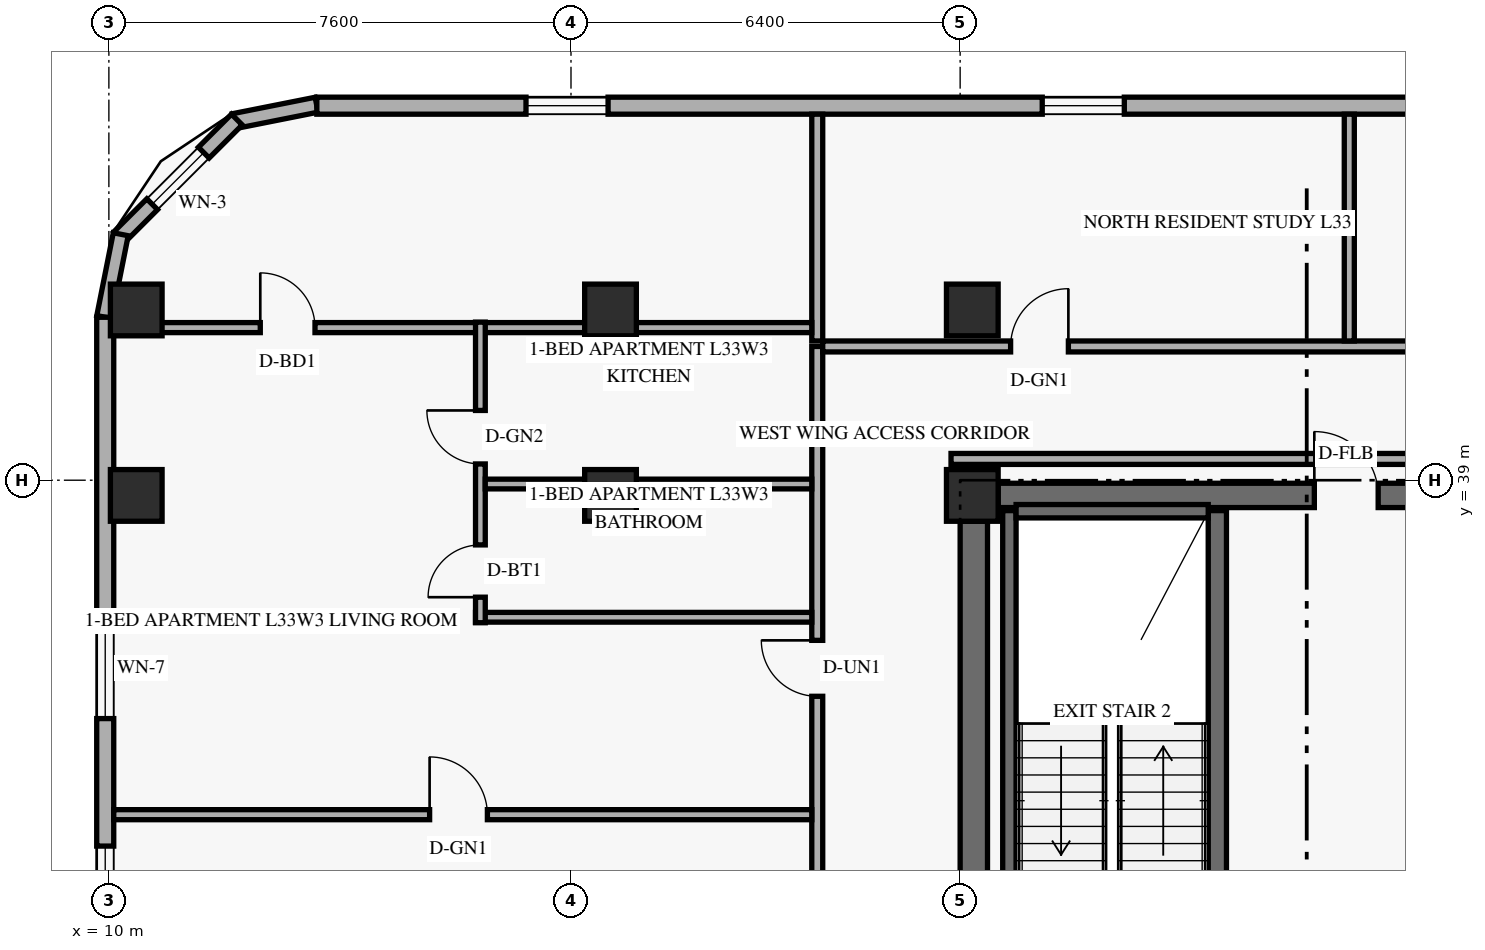
"""IFC4 building model, lengths in metres.
Left out: names, types, materials, properties, quantities, classifications, styles, units other than length and angle.
Written with IfcOpenShell. Run it as: python <this file> out.ifc"""

import sys

from ifc_helpers import new_model, si_unit, direction, frame, frame_2d, origin, origin_2d, place, context, subcontext, project, spatial, rectangle, extrude, element, fill, save


model = new_model("IFC4")
c1 = context("Model", 3, precision=1e-05, world=origin(), true_north=direction((0.0, 1.0)))
c2 = subcontext(c1, "Body", "Model", "MODEL_VIEW")
j1 = project(units=[si_unit("LENGTHUNIT", "METRE"), si_unit("PLANEANGLEUNIT", "RADIAN")], contexts=[c1])
p1 = place(None, origin())
s1 = spatial("IfcSite", under=j1, at=p1, CompositionType="ELEMENT")
p2 = place(p1, origin())
s2 = spatial("IfcBuilding", under=s1, at=p2, CompositionType="ELEMENT")
p3 = place(p2, frame((0.0, 0.0, 128.4)))
s3 = spatial("IfcBuildingStorey", under=s2, at=p3, CompositionType="ELEMENT", Elevation=128.4)
p4 = place(p3, frame((24.225, 30.625, 0.0), z_axis=(0.0, 0.0, 1.0), x_axis=(0.0, 1.0, 0.0)))
e1 = element("IfcWall", 1, at=p4, inside=s3, PredefinedType="SHEAR", context=c2, shape_type="SweptSolid", body=[
    extrude(rectangle(XDim=7.7, YDim=0.45, at=frame_2d((3.85, 0.0))), origin(), (0.0, 0.0, 1.0), 2.749),
])
p5 = place(p3, frame((24.625, 38.75, 0.0), z_axis=(0.0, 0.0, 1.0), x_axis=(1.0, 0.0, 0.0)))
e2 = element("IfcWall", 2, at=p5, inside=s3, PredefinedType="SHEAR", context=c2, shape_type="SweptSolid", body=[
    extrude(rectangle(XDim=10.15, YDim=0.4, at=frame_2d((5.075, 0.0))), origin(), (0.0, 0.0, 1.0), 3.36),
])
p6 = place(p5, frame((5.2, 0.0, 0.0)))
e3 = element("IfcOpeningElement", 3, at=p6, cuts=e2, PredefinedType="OPENING", context=c2, shape_type="SweptSolid", body=[
    extrude(rectangle(XDim=1.05, YDim=2.15, at=frame_2d((0.525, 1.075))), frame((0.0, 0.21, 0.0), z_axis=(0.0, -1.0, 0.0), x_axis=(1.0, 0.0, 0.0)), (0.0, 0.0, 1.0), 0.42),
])
p7 = place(p3, frame((24.81, 30.74, 0.0), z_axis=(0.0, 0.0, 1.0), x_axis=(0.0, 1.0, 0.0)))
e4 = element("IfcWall", 4, at=p7, inside=s3, PredefinedType="SHEAR", context=c2, shape_type="SweptSolid", body=[
    extrude(rectangle(XDim=7.76, YDim=0.22, at=frame_2d((3.88, 0.0))), origin(), (0.0, 0.0, 1.0), 3.36),
])
p8 = place(p3, frame((28.23, 30.74, 0.0), z_axis=(0.0, 0.0, 1.0), x_axis=(0.0, 1.0, 0.0)))
e5 = element("IfcWall", 5, at=p8, inside=s3, PredefinedType="SHEAR", context=c2, shape_type="SweptSolid", body=[
    extrude(rectangle(XDim=7.76, YDim=0.3, at=frame_2d((3.88, 0.0))), origin(), (0.0, 0.0, 1.0), 3.36),
])
p9 = place(p3, frame((24.92, 38.49, 0.0), z_axis=(0.0, 0.0, 1.0), x_axis=(1.0, 0.0, 0.0)))
e6 = element("IfcWall", 6, at=p9, inside=s3, PredefinedType="SHEAR", context=c2, shape_type="SweptSolid", body=[
    extrude(rectangle(XDim=3.16, YDim=0.22, at=frame_2d((1.58, 0.0))), origin(), (0.0, 0.0, 1.0), 3.36),
])
for number, where, z_axis, x_axis in (
    (7, (10.45, 38.75, 0.0), (0.0, 0.0, 1.0), (1.0, 0.0, 0.0)),
    (8, (10.45, 41.8, 0.0), (0.0, 0.0, 1.0), (1.0, 0.0, 0.0)),
    (9, (18.25, 38.75, 0.0), (0.0, 0.0, 1.0), (1.0, 0.0, 0.0)),
    (10, (18.25, 41.8, 0.0), (0.0, 0.0, 1.0), (1.0, 0.0, 0.0)),
    (11, (24.2, 38.75, 0.0), (0.0, 0.0, 1.0), (1.0, 0.0, 0.0)),
    (12, (24.2, 41.8, 0.0), (0.0, 0.0, 1.0), (1.0, 0.0, 0.0)),
):
    element("IfcColumn", number, at=place(p3, frame(where, z_axis=z_axis, x_axis=x_axis)), inside=s3, PredefinedType="COLUMN", context=c2, shape_type="SweptSolid", body=[
        extrude(rectangle(XDim=0.85, YDim=0.85, at=origin_2d()), origin(), (0.0, 0.0, 1.0), 3.6),
    ])
p10 = place(p3, frame((13.417, 45.176, 0.0), z_axis=(0.0, 0.0, 1.0), x_axis=(-0.980809899341, -0.19496651342, 0.0)))
e13 = element("IfcWall", 13, at=p10, inside=s3, PredefinedType="SOLIDWALL", context=c2, shape_type="SweptSolid", body=[
    extrude(rectangle(XDim=1.389, YDim=0.25, at=frame_2d((0.694, 0.0))), origin(), (0.0, 0.0, 1.0), 3.36),
])
p11 = place(p3, frame((12.105, 44.932, 0.0), z_axis=(0.0, 0.0, 1.0), x_axis=(-0.707151344399, -0.707062215165, 0.0)))
e14 = element("IfcWall", 14, at=p11, inside=s3, PredefinedType="SOLIDWALL", context=c2, shape_type="SweptSolid", body=[
    extrude(rectangle(XDim=2.739, YDim=0.25, at=frame_2d((1.37, 0.0))), origin(), (0.0, 0.0, 1.0), 3.36),
])
p12 = place(p11, frame((0.77, 0.0, 0.85)))
e15 = element("IfcOpeningElement", 15, at=p12, cuts=e14, PredefinedType="OPENING", context=c2, shape_type="SweptSolid", body=[
    extrude(rectangle(XDim=1.2, YDim=1.5, at=frame_2d((0.6, 0.75))), frame((0.0, 0.135, 0.0), z_axis=(0.0, -1.0, 0.0), x_axis=(1.0, 0.0, 0.0)), (0.0, 0.0, 1.0), 0.27),
])
p13 = place(p3, frame((10.195, 43.045, 0.0), z_axis=(0.0, 0.0, 1.0), x_axis=(-0.195000137217, -0.980803214965, 0.0)))
e16 = element("IfcWall", 16, at=p13, inside=s3, PredefinedType="SOLIDWALL", context=c2, shape_type="SweptSolid", body=[
    extrude(rectangle(XDim=1.388, YDim=0.25, at=frame_2d((0.694, 0.0))), origin(), (0.0, 0.0, 1.0), 3.36),
])
p14 = place(p3, frame((49.98, 45.16, 0.0), z_axis=(0.0, 0.0, 1.0), x_axis=(-1.0, 0.0, 0.0)))
e17 = element("IfcWall", 17, at=p14, inside=s3, PredefinedType="SOLIDWALL", context=c2, shape_type="SweptSolid", body=[
    extrude(rectangle(XDim=36.56, YDim=0.28, at=frame_2d((18.28, 0.0))), origin(), (0.0, 0.0, 1.0), 3.36),
])
p15 = place(p14, frame((31.77, 0.0, 0.85)))
e18 = element("IfcOpeningElement", 18, at=p15, cuts=e17, PredefinedType="OPENING", context=c2, shape_type="SweptSolid", body=[
    extrude(rectangle(XDim=1.35, YDim=1.55, at=frame_2d((0.675, 0.775))), frame((0.0, 0.15, 0.0), z_axis=(0.0, -1.0, 0.0), x_axis=(1.0, 0.0, 0.0)), (0.0, 0.0, 1.0), 0.3),
])
p16 = place(p14, frame((23.28, 0.0, 0.85)))
e19 = element("IfcOpeningElement", 19, at=p16, cuts=e17, PredefinedType="OPENING", context=c2, shape_type="SweptSolid", body=[
    extrude(rectangle(XDim=1.35, YDim=1.55, at=frame_2d((0.675, 0.775))), frame((0.0, 0.15, 0.0), z_axis=(0.0, -1.0, 0.0), x_axis=(1.0, 0.0, 0.0)), (0.0, 0.0, 1.0), 0.3),
])
p17 = place(p14, frame((16.395, 0.0, 0.85)))
e20 = element("IfcOpeningElement", 20, at=p17, cuts=e17, PredefinedType="OPENING", context=c2, shape_type="SweptSolid", body=[
    extrude(rectangle(XDim=1.35, YDim=1.55, at=frame_2d((0.675, 0.775))), frame((0.0, 0.15, 0.0), z_axis=(0.0, -1.0, 0.0), x_axis=(1.0, 0.0, 0.0)), (0.0, 0.0, 1.0), 0.3),
])
p18 = place(p14, frame((10.49, 0.0, 0.85)))
e21 = element("IfcOpeningElement", 21, at=p18, cuts=e17, PredefinedType="OPENING", context=c2, shape_type="SweptSolid", body=[
    extrude(rectangle(XDim=1.35, YDim=1.55, at=frame_2d((0.675, 0.775))), frame((0.0, 0.15, 0.0), z_axis=(0.0, -1.0, 0.0), x_axis=(1.0, 0.0, 0.0)), (0.0, 0.0, 1.0), 0.3),
])
p19 = place(p14, frame((4.6, 0.0, 0.85)))
e22 = element("IfcOpeningElement", 22, at=p19, cuts=e17, PredefinedType="OPENING", context=c2, shape_type="SweptSolid", body=[
    extrude(rectangle(XDim=1.35, YDim=1.55, at=frame_2d((0.675, 0.775))), frame((0.0, 0.15, 0.0), z_axis=(0.0, -1.0, 0.0), x_axis=(1.0, 0.0, 0.0)), (0.0, 0.0, 1.0), 0.3),
])
p20 = place(p14, frame((0.715, 0.0, 0.85)))
e23 = element("IfcOpeningElement", 23, at=p20, cuts=e17, PredefinedType="OPENING", context=c2, shape_type="SweptSolid", body=[
    extrude(rectangle(XDim=1.35, YDim=1.55, at=frame_2d((0.675, 0.775))), frame((0.0, 0.15, 0.0), z_axis=(0.0, -1.0, 0.0), x_axis=(1.0, 0.0, 0.0)), (0.0, 0.0, 1.0), 0.3),
])
p21 = place(p3, frame((9.94, 41.68, 0.0), z_axis=(0.0, 0.0, 1.0), x_axis=(0.0, -1.0, 0.0)))
e24 = element("IfcWall", 24, at=p21, inside=s3, PredefinedType="SOLIDWALL", context=c2, shape_type="SweptSolid", body=[
    extrude(rectangle(XDim=35.36, YDim=0.28, at=frame_2d((17.68, 0.0))), origin(), (0.0, 0.0, 1.0), 3.36),
])
p22 = place(p21, frame((28.27, 0.0, 0.85)))
e25 = element("IfcOpeningElement", 25, at=p22, cuts=e24, PredefinedType="OPENING", context=c2, shape_type="SweptSolid", body=[
    extrude(rectangle(XDim=1.65, YDim=1.6, at=frame_2d((0.825, 0.8))), frame((0.0, 0.15, 0.0), z_axis=(0.0, -1.0, 0.0), x_axis=(1.0, 0.0, 0.0)), (0.0, 0.0, 1.0), 0.3),
])
p23 = place(p21, frame((22.112, 0.0, 0.85)))
e26 = element("IfcOpeningElement", 26, at=p23, cuts=e24, PredefinedType="OPENING", context=c2, shape_type="SweptSolid", body=[
    extrude(rectangle(XDim=1.2, YDim=1.5, at=frame_2d((0.6, 0.75))), frame((0.0, 0.15, 0.0), z_axis=(0.0, -1.0, 0.0), x_axis=(1.0, 0.0, 0.0)), (0.0, 0.0, 1.0), 0.3),
])
p24 = place(p21, frame((17.469, 0.0, 0.85)))
e27 = element("IfcOpeningElement", 27, at=p24, cuts=e24, PredefinedType="OPENING", context=c2, shape_type="SweptSolid", body=[
    extrude(rectangle(XDim=1.65, YDim=1.6, at=frame_2d((0.825, 0.8))), frame((0.0, 0.15, 0.0), z_axis=(0.0, -1.0, 0.0), x_axis=(1.0, 0.0, 0.0)), (0.0, 0.0, 1.0), 0.3),
])
p25 = place(p21, frame((12.562, 0.0, 0.85)))
e28 = element("IfcOpeningElement", 28, at=p25, cuts=e24, PredefinedType="OPENING", context=c2, shape_type="SweptSolid", body=[
    extrude(rectangle(XDim=1.65, YDim=1.6, at=frame_2d((0.825, 0.8))), frame((0.0, 0.15, 0.0), z_axis=(0.0, -1.0, 0.0), x_axis=(1.0, 0.0, 0.0)), (0.0, 0.0, 1.0), 0.3),
])
p26 = place(p21, frame((8.698, 0.0, 0.85)))
e29 = element("IfcOpeningElement", 29, at=p26, cuts=e24, PredefinedType="OPENING", context=c2, shape_type="SweptSolid", body=[
    extrude(rectangle(XDim=1.65, YDim=1.6, at=frame_2d((0.825, 0.8))), frame((0.0, 0.15, 0.0), z_axis=(0.0, -1.0, 0.0), x_axis=(1.0, 0.0, 0.0)), (0.0, 0.0, 1.0), 0.3),
])
p27 = place(p21, frame((4.95, 0.0, 0.85)))
e30 = element("IfcOpeningElement", 30, at=p27, cuts=e24, PredefinedType="OPENING", context=c2, shape_type="SweptSolid", body=[
    extrude(rectangle(XDim=1.65, YDim=1.6, at=frame_2d((0.825, 0.8))), frame((0.0, 0.15, 0.0), z_axis=(0.0, -1.0, 0.0), x_axis=(1.0, 0.0, 0.0)), (0.0, 0.0, 1.0), 0.3),
])
p28 = place(p3, frame((21.65, 6.8, 0.0), z_axis=(0.0, 0.0, 1.0), x_axis=(0.0, 1.0, 0.0)))
e31 = element("IfcWall", 31, at=p28, inside=s3, PredefinedType="STANDARD", context=c2, shape_type="SweptSolid", body=[
    extrude(rectangle(XDim=34.4, YDim=0.18, at=frame_2d((17.2, 0.0))), origin(), (0.0, 0.0, 1.0), 2.731),
])
p29 = place(p28, frame((5.107, 0.0, 0.0)))
e32 = element("IfcOpeningElement", 32, at=p29, cuts=e31, PredefinedType="OPENING", context=c2, shape_type="SweptSolid", body=[
    extrude(rectangle(XDim=0.92, YDim=2.15, at=frame_2d((0.46, 1.075))), frame((0.0, 0.1, 0.0), z_axis=(0.0, -1.0, 0.0), x_axis=(1.0, 0.0, 0.0)), (0.0, 0.0, 1.0), 0.2),
])
p30 = place(p28, frame((13.99, 0.0, 0.0)))
e33 = element("IfcOpeningElement", 33, at=p30, cuts=e31, PredefinedType="OPENING", context=c2, shape_type="SweptSolid", body=[
    extrude(rectangle(XDim=0.92, YDim=2.15, at=frame_2d((0.46, 1.075))), frame((0.0, 0.1, 0.0), z_axis=(0.0, -1.0, 0.0), x_axis=(1.0, 0.0, 0.0)), (0.0, 0.0, 1.0), 0.2),
])
p31 = place(p28, frame((28.646, 0.0, 0.0)))
e34 = element("IfcOpeningElement", 34, at=p31, cuts=e31, PredefinedType="OPENING", context=c2, shape_type="SweptSolid", body=[
    extrude(rectangle(XDim=0.92, YDim=2.15, at=frame_2d((0.46, 1.075))), frame((0.0, 0.1, 0.0), z_axis=(0.0, -1.0, 0.0), x_axis=(1.0, 0.0, 0.0)), (0.0, 0.0, 1.0), 0.2),
])
p32 = place(p3, frame((21.74, 41.2, 0.0), z_axis=(0.0, 0.0, 1.0), x_axis=(1.0, 0.0, 0.0)))
e35 = element("IfcWall", 35, at=p32, inside=s3, PredefinedType="STANDARD", context=c2, shape_type="SweptSolid", body=[
    extrude(rectangle(XDim=13.68, YDim=0.18, at=frame_2d((6.84, 0.0))), origin(), (0.0, 0.0, 1.0), 2.731),
])
p33 = place(p32, frame((3.09, 0.0, 0.0)))
e36 = element("IfcOpeningElement", 36, at=p33, cuts=e35, PredefinedType="OPENING", context=c2, shape_type="SweptSolid", body=[
    extrude(rectangle(XDim=0.95, YDim=2.15, at=frame_2d((0.475, 1.075))), frame((0.0, 0.1, 0.0), z_axis=(0.0, -1.0, 0.0), x_axis=(1.0, 0.0, 0.0)), (0.0, 0.0, 1.0), 0.2),
])
p34 = place(p32, frame((10.11, 0.0, 0.0)))
e37 = element("IfcOpeningElement", 37, at=p34, cuts=e35, PredefinedType="OPENING", context=c2, shape_type="SweptSolid", body=[
    extrude(rectangle(XDim=0.95, YDim=2.15, at=frame_2d((0.475, 1.075))), frame((0.0, 0.1, 0.0), z_axis=(0.0, -1.0, 0.0), x_axis=(1.0, 0.0, 0.0)), (0.0, 0.0, 1.0), 0.2),
])
p35 = place(p3, frame((23.85, 39.35, 0.0), z_axis=(0.0, 0.0, 1.0), x_axis=(1.0, 0.0, 0.0)))
e38 = element("IfcWall", 38, at=p35, inside=s3, PredefinedType="STANDARD", context=c2, shape_type="SweptSolid", body=[
    extrude(rectangle(XDim=11.57, YDim=0.18, at=frame_2d((5.785, 0.0))), origin(), (0.0, 0.0, 1.0), 2.731),
])
p36 = place(p3, frame((21.65, 41.29, 0.0), z_axis=(0.0, 0.0, 1.0), x_axis=(0.0, 1.0, 0.0)))
e39 = element("IfcWall", 39, at=p36, inside=s3, PredefinedType="PARTITIONING", context=c2, shape_type="SweptSolid", body=[
    extrude(rectangle(XDim=3.73, YDim=0.18, at=frame_2d((1.865, 0.0))), origin(), (0.0, 0.0, 1.0), 2.809),
])
p37 = place(p3, frame((10.08, 41.51, 0.0), z_axis=(0.0, 0.0, 1.0), x_axis=(1.0, 0.0, 0.0)))
e40 = element("IfcWall", 40, at=p37, inside=s3, PredefinedType="PARTITIONING", context=c2, shape_type="SweptSolid", body=[
    extrude(rectangle(XDim=11.48, YDim=0.165, at=frame_2d((5.74, 0.0))), origin(), (0.0, 0.0, 1.0), 3.36),
])
p38 = place(p37, frame((2.41, 0.0, 0.0)))
e41 = element("IfcOpeningElement", 41, at=p38, cuts=e40, PredefinedType="OPENING", context=c2, shape_type="SweptSolid", body=[
    extrude(rectangle(XDim=0.9, YDim=2.14, at=frame_2d((0.45, 1.07))), frame((0.0, 0.093, 0.0), z_axis=(0.0, -1.0, 0.0), x_axis=(1.0, 0.0, 0.0)), (0.0, 0.0, 1.0), 0.185),
])
p39 = place(p3, frame((16.03, 36.746, 0.0), z_axis=(0.0, 0.0, 1.0), x_axis=(1.0, 0.0, 0.0)))
e42 = element("IfcWall", 42, at=p39, inside=s3, PredefinedType="PLUMBINGWALL", context=c2, shape_type="SweptSolid", body=[
    extrude(rectangle(XDim=5.53, YDim=0.16, at=frame_2d((2.765, 0.0))), origin(), (0.0, 0.0, 1.0), 2.731),
])
p40 = place(p3, frame((16.11, 36.656, 0.0), z_axis=(0.0, 0.0, 1.0), x_axis=(0.0, 1.0, 0.0)))
e43 = element("IfcWall", 43, at=p40, inside=s3, PredefinedType="PLUMBINGWALL", context=c2, shape_type="SweptSolid", body=[
    extrude(rectangle(XDim=4.944, YDim=0.16, at=frame_2d((2.472, 0.0))), origin(), (0.0, 0.0, 1.0), 2.731),
])
p41 = place(p40, frame((0.42, 0.0, 0.0)))
e44 = element("IfcOpeningElement", 44, at=p41, cuts=e43, PredefinedType="OPENING", context=c2, shape_type="SweptSolid", body=[
    extrude(rectangle(XDim=0.86, YDim=2.12, at=frame_2d((0.43, 1.06))), frame((0.0, 0.09, 0.0), z_axis=(0.0, -1.0, 0.0), x_axis=(1.0, 0.0, 0.0)), (0.0, 0.0, 1.0), 0.18),
])
p42 = place(p40, frame((2.611, 0.0, 0.0)))
e45 = element("IfcOpeningElement", 45, at=p42, cuts=e43, PredefinedType="OPENING", context=c2, shape_type="SweptSolid", body=[
    extrude(rectangle(XDim=0.88, YDim=2.12, at=frame_2d((0.44, 1.06))), frame((0.0, 0.09, 0.0), z_axis=(0.0, -1.0, 0.0), x_axis=(1.0, 0.0, 0.0)), (0.0, 0.0, 1.0), 0.18),
])
p43 = place(p3, frame((16.19, 38.938, 0.0), z_axis=(0.0, 0.0, 1.0), x_axis=(1.0, 0.0, 0.0)))
e46 = element("IfcWall", 46, at=p43, inside=s3, PredefinedType="PLUMBINGWALL", context=c2, shape_type="SweptSolid", body=[
    extrude(rectangle(XDim=5.37, YDim=0.16, at=frame_2d((2.685, 0.0))), origin(), (0.0, 0.0, 1.0), 2.731),
])
p44 = place(p3, frame((10.08, 33.499, 0.0), z_axis=(0.0, 0.0, 1.0), x_axis=(1.0, 0.0, 0.0)))
e47 = element("IfcWall", 47, at=p44, inside=s3, PredefinedType="PARTITIONING", context=c2, shape_type="SweptSolid", body=[
    extrude(rectangle(XDim=11.48, YDim=0.165, at=frame_2d((5.74, 0.0))), origin(), (0.0, 0.0, 1.0), 2.731),
])
p45 = place(p44, frame((5.195, 0.0, 0.0)))
e48 = element("IfcOpeningElement", 48, at=p45, cuts=e47, PredefinedType="OPENING", context=c2, shape_type="SweptSolid", body=[
    extrude(rectangle(XDim=0.95, YDim=2.15, at=frame_2d((0.475, 1.075))), frame((0.0, 0.093, 0.0), z_axis=(0.0, -1.0, 0.0), x_axis=(1.0, 0.0, 0.0)), (0.0, 0.0, 1.0), 0.185),
])
p46 = place(p3, frame((30.4, 41.29, 0.0), z_axis=(0.0, 0.0, 1.0), x_axis=(0.0, 1.0, 0.0)))
e49 = element("IfcWall", 49, at=p46, inside=s3, PredefinedType="PARTITIONING", context=c2, shape_type="SweptSolid", body=[
    extrude(rectangle(XDim=3.73, YDim=0.165, at=frame_2d((1.865, 0.0))), origin(), (0.0, 0.0, 1.0), 2.809),
])
p47 = place(p12, origin())
e50 = element("IfcWindow", 50, at=p47, inside=s3, PartitioningType="SINGLE_PANEL", PredefinedType="WINDOW", context=c2, shape_type="SweptSolid", body=[
    extrude(rectangle(XDim=1.2, YDim=1.5, at=frame_2d((0.6, 0.75))), frame((0.0, 0.03, 0.0), z_axis=(0.0, -1.0, 0.0), x_axis=(1.0, 0.0, 0.0)), (0.0, 0.0, 1.0), 0.06),
])
fill(e15, e50)
p48 = place(p15, origin())
e51 = element("IfcWindow", 51, at=p48, inside=s3, PartitioningType="SINGLE_PANEL", PredefinedType="WINDOW", context=c2, shape_type="SweptSolid", body=[
    extrude(rectangle(XDim=1.35, YDim=1.55, at=frame_2d((0.675, 0.775))), frame((0.0, 0.03, 0.0), z_axis=(0.0, -1.0, 0.0), x_axis=(1.0, 0.0, 0.0)), (0.0, 0.0, 1.0), 0.06),
])
fill(e18, e51)
p49 = place(p16, origin())
e52 = element("IfcWindow", 52, at=p49, inside=s3, PartitioningType="SINGLE_PANEL", PredefinedType="WINDOW", context=c2, shape_type="SweptSolid", body=[
    extrude(rectangle(XDim=1.35, YDim=1.55, at=frame_2d((0.675, 0.775))), frame((0.0, 0.03, 0.0), z_axis=(0.0, -1.0, 0.0), x_axis=(1.0, 0.0, 0.0)), (0.0, 0.0, 1.0), 0.06),
])
fill(e19, e52)
p50 = place(p26, origin())
e53 = element("IfcWindow", 53, at=p50, inside=s3, PartitioningType="SINGLE_PANEL", PredefinedType="WINDOW", context=c2, shape_type="SweptSolid", body=[
    extrude(rectangle(XDim=1.65, YDim=1.6, at=frame_2d((0.825, 0.8))), frame((0.0, 0.03, 0.0), z_axis=(0.0, -1.0, 0.0), x_axis=(1.0, 0.0, 0.0)), (0.0, 0.0, 1.0), 0.06),
])
fill(e29, e53)
p51 = place(p27, origin())
e54 = element("IfcWindow", 54, at=p51, inside=s3, PartitioningType="SINGLE_PANEL", PredefinedType="WINDOW", context=c2, shape_type="SweptSolid", body=[
    extrude(rectangle(XDim=1.65, YDim=1.6, at=frame_2d((0.825, 0.8))), frame((0.0, 0.03, 0.0), z_axis=(0.0, -1.0, 0.0), x_axis=(1.0, 0.0, 0.0)), (0.0, 0.0, 1.0), 0.06),
])
fill(e30, e54)
p52 = place(p6, frame((1.05, 0.0, 0.0), z_axis=(0.0, 0.0, 1.0), x_axis=(-1.0, 0.0, 0.0)))
e55 = element("IfcDoor", 55, at=p52, inside=s3, OperationType="SINGLE_SWING_RIGHT", PredefinedType="DOOR", context=c2, shape_type="SweptSolid", body=[
    extrude(rectangle(XDim=1.05, YDim=2.15, at=frame_2d((0.525, 1.075))), frame((0.0, 0.025, 0.0), z_axis=(0.0, -1.0, 0.0), x_axis=(1.0, 0.0, 0.0)), (0.0, 0.0, 1.0), 0.05),
])
fill(e3, e55)
p53 = place(p45, origin())
e56 = element("IfcDoor", 56, at=p53, inside=s3, OperationType="SINGLE_SWING_LEFT", PredefinedType="DOOR", context=c2, shape_type="SweptSolid", body=[
    extrude(rectangle(XDim=0.95, YDim=2.15, at=frame_2d((0.475, 1.075))), frame((0.0, 0.025, 0.0), z_axis=(0.0, -1.0, 0.0), x_axis=(1.0, 0.0, 0.0)), (0.0, 0.0, 1.0), 0.05),
])
fill(e48, e56)
p54 = place(p31, origin())
e57 = element("IfcDoor", 57, at=p54, inside=s3, OperationType="SINGLE_SWING_RIGHT", PredefinedType="DOOR", context=c2, shape_type="SweptSolid", body=[
    extrude(rectangle(XDim=0.92, YDim=2.15, at=frame_2d((0.46, 1.075))), frame((0.0, 0.025, 0.0), z_axis=(0.0, -1.0, 0.0), x_axis=(1.0, 0.0, 0.0)), (0.0, 0.0, 1.0), 0.05),
])
fill(e34, e57)
p55 = place(p41, origin())
e58 = element("IfcDoor", 58, at=p55, inside=s3, OperationType="SINGLE_SWING_LEFT", PredefinedType="DOOR", context=c2, shape_type="SweptSolid", body=[
    extrude(rectangle(XDim=0.86, YDim=2.12, at=frame_2d((0.43, 1.06))), frame((0.0, 0.025, 0.0), z_axis=(0.0, -1.0, 0.0), x_axis=(1.0, 0.0, 0.0)), (0.0, 0.0, 1.0), 0.05),
])
fill(e44, e58)
p56 = place(p42, origin())
e59 = element("IfcDoor", 59, at=p56, inside=s3, OperationType="SINGLE_SWING_RIGHT", PredefinedType="DOOR", context=c2, shape_type="SweptSolid", body=[
    extrude(rectangle(XDim=0.88, YDim=2.12, at=frame_2d((0.44, 1.06))), frame((0.0, 0.025, 0.0), z_axis=(0.0, -1.0, 0.0), x_axis=(1.0, 0.0, 0.0)), (0.0, 0.0, 1.0), 0.05),
])
fill(e45, e59)
p57 = place(p38, origin())
e60 = element("IfcDoor", 60, at=p57, inside=s3, OperationType="SINGLE_SWING_LEFT", PredefinedType="DOOR", context=c2, shape_type="SweptSolid", body=[
    extrude(rectangle(XDim=0.9, YDim=2.14, at=frame_2d((0.45, 1.07))), frame((0.0, 0.025, 0.0), z_axis=(0.0, -1.0, 0.0), x_axis=(1.0, 0.0, 0.0)), (0.0, 0.0, 1.0), 0.05),
])
fill(e41, e60)
p58 = place(p33, origin())
e61 = element("IfcDoor", 61, at=p58, inside=s3, OperationType="SINGLE_SWING_RIGHT", PredefinedType="DOOR", context=c2, shape_type="SweptSolid", body=[
    extrude(rectangle(XDim=0.95, YDim=2.15, at=frame_2d((0.475, 1.075))), frame((0.0, 0.025, 0.0), z_axis=(0.0, -1.0, 0.0), x_axis=(1.0, 0.0, 0.0)), (0.0, 0.0, 1.0), 0.05),
])
fill(e36, e61)
save(model, sys.argv[1])
